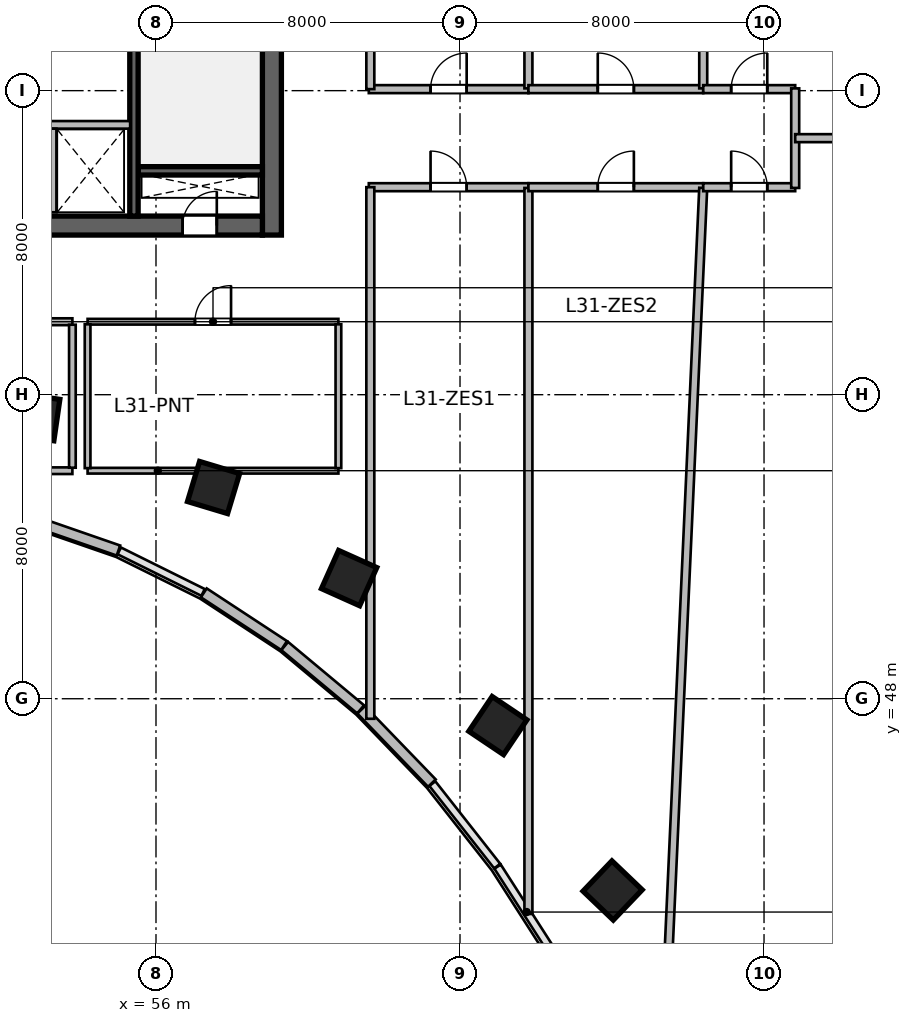
"""IFC4 building model, lengths in metres.
Left out: names, types, materials, properties, quantities, classifications, styles, units other than length and angle.
Written with IfcOpenShell. Run it as: python <this file> out.ifc"""

import sys

from ifc_helpers import new_model, si_unit, direction, frame, frame_2d, origin, origin_2d, place, context, subcontext, project, spatial, rectangle, extrude, source, transform, mapped, element, fill, save


model = new_model("IFC4")
c1 = context("Model", 3, precision=1e-05, world=origin(), true_north=direction((0.0, 1.0)))
c2 = subcontext(c1, "Body", "Model", "MODEL_VIEW")
j1 = project(units=[si_unit("LENGTHUNIT", "METRE"), si_unit("PLANEANGLEUNIT", "RADIAN")], contexts=[c1])
p1 = place(None, origin())
s1 = spatial("IfcSite", under=j1, at=p1, CompositionType="ELEMENT")
p2 = place(p1, origin())
s2 = spatial("IfcBuilding", under=s1, at=p2, CompositionType="ELEMENT")
p3 = place(p2, frame((0.0, 0.0, 131.1)))
s3 = spatial("IfcBuildingStorey", under=s2, at=p3, CompositionType="ELEMENT", Elevation=131.1)
m1 = source(origin(), c2, "Body", "SweptSolid", [
    extrude(rectangle(XDim=12.0, YDim=0.5, at=frame_2d((6.0, 0.0))), origin(), (0.0, 0.0, 1.0), 3.9),
])
p4 = place(p3, frame((59.05, 60.2, 0.0), z_axis=(0.0, 0.0, 1.0), x_axis=(0.0, 1.0, 0.0)))
e1 = element("IfcWall", 1, at=p4, inside=s3, PredefinedType="SHEAR", context=c2, shape_type="MappedRepresentation", body=[
    mapped(m1, transform((0.0, 0.0, 0.0), scale=1.0)),
])
m2 = source(origin(), c2, "Body", "SweptSolid", [
    extrude(rectangle(XDim=21.6, YDim=0.5, at=frame_2d((10.8, 0.0))), origin(), (0.0, 0.0, 1.0), 3.9),
])
p5 = place(p3, frame((37.2, 60.45, 0.0), z_axis=(0.0, 0.0, 1.0), x_axis=(1.0, 0.0, 0.0)))
e2 = element("IfcWall", 2, at=p5, inside=s3, PredefinedType="SHEAR", context=c2, shape_type="MappedRepresentation", body=[
    mapped(m2, transform((0.0, 0.0, 0.0), scale=1.0)),
])
p6 = place(p5, frame((1.1, 0.0, 0.0)))
e3 = element("IfcOpeningElement", 3, at=p6, cuts=e2, PredefinedType="OPENING", context=c2, shape_type="SweptSolid", body=[
    extrude(rectangle(XDim=1.15, YDim=2.15, at=frame_2d((0.575, 1.075))), frame((0.0, 0.26, 0.0), z_axis=(0.0, -1.0, 0.0), x_axis=(1.0, 0.0, 0.0)), (0.0, 0.0, 1.0), 0.52),
])
p7 = place(p5, frame((19.5, 0.0, 0.0)))
e4 = element("IfcOpeningElement", 4, at=p7, cuts=e2, PredefinedType="OPENING", context=c2, shape_type="SweptSolid", body=[
    extrude(rectangle(XDim=0.9, YDim=2.1, at=frame_2d((0.45, 1.05))), frame((0.0, 0.26, 0.0), z_axis=(0.0, -1.0, 0.0), x_axis=(1.0, 0.0, 0.0)), (0.0, 0.0, 1.0), 0.52),
])
p8 = place(p5, frame((12.02, 0.0, 0.0)))
e5 = element("IfcOpeningElement", 5, at=p8, cuts=e2, PredefinedType="OPENING", context=c2, shape_type="SweptSolid", body=[
    extrude(rectangle(XDim=1.6, YDim=2.15, at=frame_2d((0.8, 1.075))), frame((0.0, 0.26, 0.0), z_axis=(0.0, -1.0, 0.0), x_axis=(1.0, 0.0, 0.0)), (0.0, 0.0, 1.0), 0.52),
])
m3 = source(origin(), c2, "Body", "SweptSolid", [
    extrude(rectangle(XDim=3.27, YDim=0.22, at=frame_2d((1.635, 0.0))), origin(), (0.0, 0.0, 1.0), 3.9),
])
p9 = place(p3, frame((55.53, 61.89, 0.0), z_axis=(0.0, 0.0, 1.0), x_axis=(1.0, 0.0, 0.0)))
e6 = element("IfcWall", 6, at=p9, inside=s3, PredefinedType="SHEAR", context=c2, shape_type="MappedRepresentation", body=[
    mapped(m3, transform((0.0, 0.0, 0.0), scale=1.0)),
])
m4 = source(origin(), c2, "Body", "SweptSolid", [
    extrude(rectangle(XDim=11.0, YDim=0.22, at=frame_2d((5.5, 0.0))), origin(), (0.0, 0.0, 1.0), 3.9),
])
p10 = place(p3, frame((55.42, 60.7, 0.0), z_axis=(0.0, 0.0, 1.0), x_axis=(0.0, 1.0, 0.0)))
e7 = element("IfcWall", 7, at=p10, inside=s3, PredefinedType="SHEAR", context=c2, shape_type="MappedRepresentation", body=[
    mapped(m4, transform((0.0, 0.0, 0.0), scale=1.0)),
])
p11 = place(p10, frame((9.545, 0.0, 0.0)))
e8 = element("IfcOpeningElement", 8, at=p11, cuts=e7, PredefinedType="OPENING", context=c2, shape_type="SweptSolid", body=[
    extrude(rectangle(XDim=1.15, YDim=2.15, at=frame_2d((0.575, 1.075))), frame((0.0, 0.12, 0.0), z_axis=(0.0, -1.0, 0.0), x_axis=(1.0, 0.0, 0.0)), (0.0, 0.0, 1.0), 0.24),
])
m5 = source(origin(), c2, "Body", "SweptSolid", [
    extrude(rectangle(XDim=1.1, YDim=1.1, at=origin_2d()), origin(), (0.0, 0.0, 1.0), 3.9),
])
for number, where, z_axis, x_axis in (
    (9, (52.846, 55.411, 0.0), (0.0, 0.0, 1.0), (0.143, 0.99, 0.0)),
    (10, (57.515, 53.558, 0.0), (0.0, 0.0, 1.0), (0.289, 0.957, 0.0)),
    (11, (61.082, 51.175, 0.0), (0.0, 0.0, 1.0), (0.409, 0.912, 0.0)),
    (12, (64.996, 47.294, 0.0), (0.0, 0.0, 1.0), (0.558, 0.83, 0.0)),
    (13, (68.015, 42.955, 0.0), (0.0, 0.0, 1.0), (0.691, 0.723, 0.0)),
):
    element("IfcColumn", number, at=place(p3, frame(where, z_axis=z_axis, x_axis=x_axis)), inside=s3, PredefinedType="COLUMN", context=c2, shape_type="MappedRepresentation", body=[
        mapped(m5, transform((0.0, 0.0, 0.0), scale=1.0)),
    ])
m6 = source(origin(), c2, "Body", "SweptSolid", [
    extrude(rectangle(XDim=2.68, YDim=0.28, at=frame_2d((1.34, 0.0))), origin(), (0.0, 0.0, 1.0), 3.65),
])
p12 = place(p3, frame((63.26, 45.78, 0.0), z_axis=(0.0, 0.0, 1.0), x_axis=(-0.694561996568, 0.719432855049, 0.0)))
e14 = element("IfcWall", 14, at=p12, inside=s3, PredefinedType="SOLIDWALL", context=c2, shape_type="MappedRepresentation", body=[
    mapped(m6, transform((0.0, 0.0, 0.0), scale=1.0)),
])
m7 = source(origin(), c2, "Body", "SweptSolid", [
    extrude(rectangle(XDim=2.601, YDim=0.28, at=frame_2d((1.3, 0.0))), origin(), (0.0, 0.0, 1.0), 3.65),
])
p13 = place(p3, frame((61.385, 47.721, 0.0), z_axis=(0.0, 0.0, 1.0), x_axis=(-0.76796730295, 0.640489048775, 0.0)))
e15 = element("IfcWall", 15, at=p13, inside=s3, PredefinedType="SOLIDWALL", context=c2, shape_type="MappedRepresentation", body=[
    mapped(m7, transform((0.0, 0.0, 0.0), scale=1.0)),
])
m8 = source(origin(), c2, "Body", "SweptSolid", [
    extrude(rectangle(XDim=2.527, YDim=0.28, at=frame_2d((1.264, 0.0))), origin(), (0.0, 0.0, 1.0), 3.65),
])
p14 = place(p3, frame((59.371, 49.399, 0.0), z_axis=(0.0, 0.0, 1.0), x_axis=(-0.836011905051, 0.548711303523, 0.0)))
e16 = element("IfcWall", 16, at=p14, inside=s3, PredefinedType="SOLIDWALL", context=c2, shape_type="MappedRepresentation", body=[
    mapped(m8, transform((0.0, 0.0, 0.0), scale=1.0)),
])
m9 = source(origin(), c2, "Body", "SweptSolid", [
    extrude(rectangle(XDim=2.411, YDim=0.28, at=frame_2d((1.205, 0.0))), origin(), (0.0, 0.0, 1.0), 3.65),
])
p15 = place(p3, frame((55.012, 51.899, 0.0), z_axis=(0.0, 0.0, 1.0), x_axis=(-0.944880068161, 0.327416640982, 0.0)))
e17 = element("IfcWall", 17, at=p15, inside=s3, PredefinedType="SOLIDWALL", context=c2, shape_type="MappedRepresentation", body=[
    mapped(m9, transform((0.0, 0.0, 0.0), scale=1.0)),
])
m10 = source(origin(), c2, "Body", "SweptSolid", [
    extrude(rectangle(XDim=4.1, YDim=0.2, at=frame_2d((2.05, 0.0))), origin(), (0.0, 0.0, 1.0), 3.65),
])
p16 = place(p3, frame((51.22, 63.1, 0.0), z_axis=(0.0, 0.0, 1.0), x_axis=(1.0, 0.0, 0.0)))
e18 = element("IfcWall", 18, at=p16, inside=s3, PredefinedType="SOLIDWALL", context=c2, shape_type="MappedRepresentation", body=[
    mapped(m10, transform((0.0, 0.0, 0.0), scale=1.0)),
])
m11 = source(origin(), c2, "Body", "SweptSolid", [
    extrude(rectangle(XDim=2.2, YDim=0.2, at=frame_2d((1.1, 0.0))), origin(), (0.0, 0.0, 1.0), 3.65),
])
p17 = place(p3, frame((53.28, 60.8, 0.0), z_axis=(0.0, 0.0, 1.0), x_axis=(0.0, 1.0, 0.0)))
e19 = element("IfcWall", 19, at=p17, inside=s3, PredefinedType="SOLIDWALL", context=c2, shape_type="MappedRepresentation", body=[
    mapped(m11, transform((0.0, 0.0, 0.0), scale=1.0)),
])
m12 = source(origin(), c2, "Body", "SweptSolid", [
    extrude(rectangle(XDim=3.248, YDim=0.175, at=frame_2d((1.624, 0.0))), origin(), (0.0, 0.0, 1.0), 3.65),
])
p18 = place(p3, frame((50.552, 54.0, 0.0), z_axis=(0.0, 0.0, 1.0), x_axis=(1.0, 0.0, 0.0)))
e20 = element("IfcWall", 20, at=p18, inside=s3, PredefinedType="PARTITIONING", context=c2, shape_type="MappedRepresentation", body=[
    mapped(m12, transform((0.0, 0.0, 0.0), scale=1.0)),
])
m13 = source(origin(), c2, "Body", "SweptSolid", [
    extrude(rectangle(XDim=3.248, YDim=0.18, at=frame_2d((1.624, 0.0))), origin(), (0.0, 0.0, 1.0), 3.65),
])
p19 = place(p3, frame((50.552, 57.92, 0.0), z_axis=(0.0, 0.0, 1.0), x_axis=(1.0, 0.0, 0.0)))
e21 = element("IfcWall", 21, at=p19, inside=s3, PredefinedType="PLUMBINGWALL", context=c2, shape_type="MappedRepresentation", body=[
    mapped(m13, transform((0.0, 0.0, 0.0), scale=1.0)),
])
p20 = place(p19, frame((1.149, 0.0, 0.0)))
e22 = element("IfcOpeningElement", 22, at=p20, cuts=e21, PredefinedType="OPENING", context=c2, shape_type="SweptSolid", body=[
    extrude(rectangle(XDim=0.95, YDim=2.12, at=frame_2d((0.475, 1.06))), frame((0.0, 0.1, 0.0), z_axis=(0.0, -1.0, 0.0), x_axis=(1.0, 0.0, 0.0)), (0.0, 0.0, 1.0), 0.2),
])
m14 = source(origin(), c2, "Body", "SweptSolid", [
    extrude(rectangle(XDim=3.763, YDim=0.175, at=frame_2d((1.881, 0.0))), origin(), (0.0, 0.0, 1.0), 3.65),
])
p21 = place(p3, frame((53.8, 54.079, 0.0), z_axis=(0.0, 0.0, 1.0), x_axis=(0.0, 1.0, 0.0)))
e23 = element("IfcWall", 23, at=p21, inside=s3, PredefinedType="PARTITIONING", context=c2, shape_type="MappedRepresentation", body=[
    mapped(m14, transform((0.0, 0.0, 0.0), scale=1.0)),
])
m15 = source(origin(), c2, "Body", "SweptSolid", [
    extrude(rectangle(XDim=6.6, YDim=0.15, at=frame_2d((3.3, 0.0))), origin(), (0.0, 0.0, 1.0), 3.095),
])
p22 = place(p3, frame((54.2, 54.0, 0.0), z_axis=(0.0, 0.0, 1.0), x_axis=(1.0, 0.0, 0.0)))
e24 = element("IfcWall", 24, at=p22, inside=s3, PredefinedType="PARTITIONING", context=c2, shape_type="MappedRepresentation", body=[
    mapped(m15, transform((0.0, 0.0, 0.0), scale=1.0)),
])
m16 = source(origin(), c2, "Body", "SweptSolid", [
    extrude(rectangle(XDim=6.6, YDim=0.15, at=frame_2d((3.3, 0.0))), origin(), (0.0, 0.0, 1.0), 3.65),
])
p23 = place(p3, frame((54.2, 57.92, 0.0), z_axis=(0.0, 0.0, 1.0), x_axis=(1.0, 0.0, 0.0)))
e25 = element("IfcWall", 25, at=p23, inside=s3, PredefinedType="PARTITIONING", context=c2, shape_type="MappedRepresentation", body=[
    mapped(m16, transform((0.0, 0.0, 0.0), scale=1.0)),
])
p24 = place(p23, frame((2.825, 0.0, 0.0)))
e26 = element("IfcOpeningElement", 26, at=p24, cuts=e25, PredefinedType="OPENING", context=c2, shape_type="SweptSolid", body=[
    extrude(rectangle(XDim=0.95, YDim=2.1, at=frame_2d((0.475, 1.05))), frame((0.0, 0.085, 0.0), z_axis=(0.0, -1.0, 0.0), x_axis=(1.0, 0.0, 0.0)), (0.0, 0.0, 1.0), 0.17),
])
m17 = source(origin(), c2, "Body", "SweptSolid", [
    extrude(rectangle(XDim=3.785, YDim=0.15, at=frame_2d((1.893, 0.0))), origin(), (0.0, 0.0, 1.0), 3.65),
])
for number, where, z_axis, x_axis in (
    (27, (54.2, 54.067, 0.0), (0.0, 0.0, 1.0), (0.0, 1.0, 0.0)),
    (28, (60.8, 54.067, 0.0), (0.0, 0.0, 1.0), (0.0, 1.0, 0.0)),
):
    element("IfcWall", number, at=place(p3, frame(where, z_axis=z_axis, x_axis=x_axis)), inside=s3, PredefinedType="PARTITIONING", context=c2, shape_type="MappedRepresentation", body=[
        mapped(m17, transform((0.0, 0.0, 0.0), scale=1.0)),
    ])
m18 = source(origin(), c2, "Body", "SweptSolid", [
    extrude(rectangle(XDim=4.2, YDim=0.21, at=frame_2d((2.1, 0.0))), origin(), (0.0, 0.0, 1.0), 3.65),
])
p25 = place(p3, frame((61.6, 64.04, 0.0), z_axis=(0.0, 0.0, 1.0), x_axis=(1.0, 0.0, 0.0)))
e29 = element("IfcWall", 29, at=p25, inside=s3, PredefinedType="PARTITIONING", context=c2, shape_type="MappedRepresentation", body=[
    mapped(m18, transform((0.0, 0.0, 0.0), scale=1.0)),
])
p26 = place(p25, frame((1.625, 0.0, 0.0)))
e30 = element("IfcOpeningElement", 30, at=p26, cuts=e29, PredefinedType="OPENING", context=c2, shape_type="SweptSolid", body=[
    extrude(rectangle(XDim=0.95, YDim=2.1, at=frame_2d((0.475, 1.05))), frame((0.0, 0.115, 0.0), z_axis=(0.0, -1.0, 0.0), x_axis=(1.0, 0.0, 0.0)), (0.0, 0.0, 1.0), 0.23),
])
m19 = source(origin(), c2, "Body", "SweptSolid", [
    extrude(rectangle(XDim=9.736, YDim=0.21, at=frame_2d((4.868, 0.0))), origin(), (0.0, 0.0, 1.0), 3.65),
])
p27 = place(p3, frame((65.8, 64.06, 0.0), z_axis=(0.0, 0.0, 1.0), x_axis=(0.0, 1.0, 0.0)))
e31 = element("IfcWall", 31, at=p27, inside=s3, PredefinedType="PARTITIONING", context=c2, shape_type="MappedRepresentation", body=[
    mapped(m19, transform((0.0, 0.0, 0.0), scale=1.0)),
])
m20 = source(origin(), c2, "Body", "SweptSolid", [
    extrude(rectangle(XDim=4.6, YDim=0.21, at=frame_2d((2.3, 0.0))), origin(), (0.0, 0.0, 1.0), 3.65),
])
p28 = place(p3, frame((65.8, 64.04, 0.0), z_axis=(0.0, 0.0, 1.0), x_axis=(1.0, 0.0, 0.0)))
e32 = element("IfcWall", 32, at=p28, inside=s3, PredefinedType="PARTITIONING", context=c2, shape_type="MappedRepresentation", body=[
    mapped(m20, transform((0.0, 0.0, 0.0), scale=1.0)),
])
p29 = place(p28, frame((1.825, 0.0, 0.0)))
e33 = element("IfcOpeningElement", 33, at=p29, cuts=e32, PredefinedType="OPENING", context=c2, shape_type="SweptSolid", body=[
    extrude(rectangle(XDim=0.95, YDim=2.1, at=frame_2d((0.475, 1.05))), frame((0.0, 0.115, 0.0), z_axis=(0.0, -1.0, 0.0), x_axis=(1.0, 0.0, 0.0)), (0.0, 0.0, 1.0), 0.23),
])
m21 = source(origin(), c2, "Body", "SweptSolid", [
    extrude(rectangle(XDim=6.398, YDim=0.21, at=frame_2d((3.199, 0.0))), origin(), (0.0, 0.0, 1.0), 3.65),
])
p30 = place(p3, frame((70.4, 64.06, 0.0), z_axis=(0.0, 0.0, 1.0), x_axis=(0.0, 1.0, 0.0)))
e34 = element("IfcWall", 34, at=p30, inside=s3, PredefinedType="PARTITIONING", context=c2, shape_type="MappedRepresentation", body=[
    mapped(m21, transform((0.0, 0.0, 0.0), scale=1.0)),
])
m22 = source(origin(), c2, "Body", "SweptSolid", [
    extrude(rectangle(XDim=2.42, YDim=0.21, at=frame_2d((1.21, 0.0))), origin(), (0.0, 0.0, 1.0), 3.65),
])
p31 = place(p3, frame((70.4, 64.04, 0.0), z_axis=(0.0, 0.0, 1.0), x_axis=(1.0, 0.0, 0.0)))
e35 = element("IfcWall", 35, at=p31, inside=s3, PredefinedType="PARTITIONING", context=c2, shape_type="MappedRepresentation", body=[
    mapped(m22, transform((0.0, 0.0, 0.0), scale=1.0)),
])
p32 = place(p31, frame((0.735, 0.0, 0.0)))
e36 = element("IfcOpeningElement", 36, at=p32, cuts=e35, PredefinedType="OPENING", context=c2, shape_type="SweptSolid", body=[
    extrude(rectangle(XDim=0.95, YDim=2.1, at=frame_2d((0.475, 1.05))), frame((0.0, 0.115, 0.0), z_axis=(0.0, -1.0, 0.0), x_axis=(1.0, 0.0, 0.0)), (0.0, 0.0, 1.0), 0.23),
])
p33 = place(p3, frame((61.6, 61.46, 0.0), z_axis=(0.0, 0.0, 1.0), x_axis=(1.0, 0.0, 0.0)))
e37 = element("IfcWall", 37, at=p33, inside=s3, PredefinedType="PARTITIONING", context=c2, shape_type="MappedRepresentation", body=[
    mapped(m18, transform((0.0, 0.0, 0.0), scale=1.0)),
])
p34 = place(p33, frame((1.625, 0.0, 0.0)))
e38 = element("IfcOpeningElement", 38, at=p34, cuts=e37, PredefinedType="OPENING", context=c2, shape_type="SweptSolid", body=[
    extrude(rectangle(XDim=0.95, YDim=2.1, at=frame_2d((0.475, 1.05))), frame((0.0, 0.115, 0.0), z_axis=(0.0, -1.0, 0.0), x_axis=(1.0, 0.0, 0.0)), (0.0, 0.0, 1.0), 0.23),
])
m23 = source(origin(), c2, "Body", "SweptSolid", [
    extrude(rectangle(XDim=19.103, YDim=0.21, at=frame_2d((9.552, 0.0))), origin(), (0.0, 0.0, 1.0), 2.942),
])
p35 = place(p3, frame((65.8, 42.337, 0.0), z_axis=(0.0, 0.0, 1.0), x_axis=(0.0, 1.0, 0.0)))
e39 = element("IfcWall", 39, at=p35, inside=s3, PredefinedType="PARTITIONING", context=c2, shape_type="MappedRepresentation", body=[
    mapped(m23, transform((0.0, 0.0, 0.0), scale=1.0)),
])
p36 = place(p3, frame((65.8, 61.46, 0.0), z_axis=(0.0, 0.0, 1.0), x_axis=(1.0, 0.0, 0.0)))
e40 = element("IfcWall", 40, at=p36, inside=s3, PredefinedType="PARTITIONING", context=c2, shape_type="MappedRepresentation", body=[
    mapped(m20, transform((0.0, 0.0, 0.0), scale=1.0)),
])
p37 = place(p36, frame((1.825, 0.0, 0.0)))
e41 = element("IfcOpeningElement", 41, at=p37, cuts=e40, PredefinedType="OPENING", context=c2, shape_type="SweptSolid", body=[
    extrude(rectangle(XDim=0.95, YDim=2.1, at=frame_2d((0.475, 1.05))), frame((0.0, 0.115, 0.0), z_axis=(0.0, -1.0, 0.0), x_axis=(1.0, 0.0, 0.0)), (0.0, 0.0, 1.0), 0.23),
])
m24 = source(origin(), c2, "Body", "SweptSolid", [
    extrude(rectangle(XDim=24.224, YDim=0.21, at=frame_2d((12.112, 0.0))), origin(), (0.0, 0.0, 1.0), 2.942),
])
p38 = place(p3, frame((69.302, 37.241, 0.0), z_axis=(0.0, 0.0, 1.0), x_axis=(0.045312570313, 0.998972857975, 0.0)))
e42 = element("IfcWall", 42, at=p38, inside=s3, PredefinedType="PARTITIONING", context=c2, shape_type="MappedRepresentation", body=[
    mapped(m24, transform((0.0, 0.0, 0.0), scale=1.0)),
])
p39 = place(p3, frame((70.4, 61.46, 0.0), z_axis=(0.0, 0.0, 1.0), x_axis=(1.0, 0.0, 0.0)))
e43 = element("IfcWall", 43, at=p39, inside=s3, PredefinedType="PARTITIONING", context=c2, shape_type="MappedRepresentation", body=[
    mapped(m22, transform((0.0, 0.0, 0.0), scale=1.0)),
])
p40 = place(p39, frame((0.735, 0.0, 0.0)))
e44 = element("IfcOpeningElement", 44, at=p40, cuts=e43, PredefinedType="OPENING", context=c2, shape_type="SweptSolid", body=[
    extrude(rectangle(XDim=0.95, YDim=2.1, at=frame_2d((0.475, 1.05))), frame((0.0, 0.115, 0.0), z_axis=(0.0, -1.0, 0.0), x_axis=(1.0, 0.0, 0.0)), (0.0, 0.0, 1.0), 0.23),
])
m25 = source(origin(), c2, "Body", "SweptSolid", [
    extrude(rectangle(XDim=13.988, YDim=0.21, at=frame_2d((6.994, 0.0))), origin(), (0.0, 0.0, 1.0), 2.942),
])
p41 = place(p3, frame((61.64, 47.472, 0.0), z_axis=(0.0, 0.0, 1.0), x_axis=(0.0, 1.0, 0.0)))
e45 = element("IfcWall", 45, at=p41, inside=s3, PredefinedType="PARTITIONING", context=c2, shape_type="MappedRepresentation", body=[
    mapped(m25, transform((0.0, 0.0, 0.0), scale=1.0)),
])
m26 = source(origin(), c2, "Body", "SweptSolid", [
    extrude(rectangle(XDim=11.987, YDim=0.21, at=frame_2d((5.994, 0.0))), origin(), (0.0, 0.0, 1.0), 3.65),
])
p42 = place(p3, frame((61.64, 64.04, 0.0), z_axis=(0.0, 0.0, 1.0), x_axis=(0.0, 1.0, 0.0)))
e46 = element("IfcWall", 46, at=p42, inside=s3, PredefinedType="PARTITIONING", context=c2, shape_type="MappedRepresentation", body=[
    mapped(m26, transform((0.0, 0.0, 0.0), scale=1.0)),
])
m27 = source(origin(), c2, "Body", "SweptSolid", [
    extrude(rectangle(XDim=2.62, YDim=0.21, at=frame_2d((1.31, 0.0))), origin(), (0.0, 0.0, 1.0), 3.28),
])
p43 = place(p3, frame((72.82, 61.44, 0.0), z_axis=(0.0, 0.0, 1.0), x_axis=(0.0, 1.0, 0.0)))
e47 = element("IfcWall", 47, at=p43, inside=s3, PredefinedType="PARTITIONING", context=c2, shape_type="MappedRepresentation", body=[
    mapped(m27, transform((0.0, 0.0, 0.0), scale=1.0)),
])
m28 = source(origin(), c2, "Body", "SweptSolid", [
    extrude(rectangle(XDim=4.917, YDim=0.21, at=frame_2d((2.459, 0.0))), origin(), (0.0, 0.0, 1.0), 3.65),
])
p44 = place(p3, frame((72.82, 62.75, 0.0), z_axis=(0.0, 0.0, 1.0), x_axis=(1.0, 0.0, 0.0)))
e48 = element("IfcWall", 48, at=p44, inside=s3, PredefinedType="PARTITIONING", context=c2, shape_type="MappedRepresentation", body=[
    mapped(m28, transform((0.0, 0.0, 0.0), scale=1.0)),
])
m29 = source(origin(), c2, "Body", "SweptSolid", [
    extrude(rectangle(XDim=0.9, YDim=2.1, at=frame_2d((0.45, 1.05))), frame((0.0, 0.025, 0.0), z_axis=(0.0, -1.0, 0.0), x_axis=(1.0, 0.0, 0.0)), (0.0, 0.0, 1.0), 0.05),
])
p45 = place(p7, origin())
e49 = element("IfcDoor", 49, at=p45, inside=s3, OperationType="SINGLE_SWING_RIGHT", PredefinedType="DOOR", context=c2, shape_type="MappedRepresentation", body=[
    mapped(m29, transform((0.0, 0.0, 0.0), scale=1.0)),
])
fill(e4, e49)
m30 = source(origin(), c2, "Body", "SweptSolid", [
    extrude(rectangle(XDim=0.95, YDim=2.1, at=frame_2d((0.475, 1.05))), frame((0.0, 0.025, 0.0), z_axis=(0.0, -1.0, 0.0), x_axis=(1.0, 0.0, 0.0)), (0.0, 0.0, 1.0), 0.05),
])
p46 = place(p24, origin())
e50 = element("IfcDoor", 50, at=p46, inside=s3, OperationType="SINGLE_SWING_RIGHT", PredefinedType="DOOR", context=c2, shape_type="MappedRepresentation", body=[
    mapped(m30, transform((0.0, 0.0, 0.0), scale=1.0)),
])
fill(e26, e50)
p47 = place(p26, origin())
e51 = element("IfcDoor", 51, at=p47, inside=s3, OperationType="SINGLE_SWING_RIGHT", PredefinedType="DOOR", context=c2, shape_type="MappedRepresentation", body=[
    mapped(m30, transform((0.0, 0.0, 0.0), scale=1.0)),
])
fill(e30, e51)
p48 = place(p29, origin())
e52 = element("IfcDoor", 52, at=p48, inside=s3, OperationType="SINGLE_SWING_LEFT", PredefinedType="DOOR", context=c2, shape_type="MappedRepresentation", body=[
    mapped(m30, transform((0.0, 0.0, 0.0), scale=1.0)),
])
fill(e33, e52)
p49 = place(p32, origin())
e53 = element("IfcDoor", 53, at=p49, inside=s3, OperationType="SINGLE_SWING_RIGHT", PredefinedType="DOOR", context=c2, shape_type="MappedRepresentation", body=[
    mapped(m30, transform((0.0, 0.0, 0.0), scale=1.0)),
])
fill(e36, e53)
p50 = place(p34, origin())
e54 = element("IfcDoor", 54, at=p50, inside=s3, OperationType="SINGLE_SWING_LEFT", PredefinedType="DOOR", context=c2, shape_type="MappedRepresentation", body=[
    mapped(m30, transform((0.0, 0.0, 0.0), scale=1.0)),
])
fill(e38, e54)
p51 = place(p37, origin())
e55 = element("IfcDoor", 55, at=p51, inside=s3, OperationType="SINGLE_SWING_RIGHT", PredefinedType="DOOR", context=c2, shape_type="MappedRepresentation", body=[
    mapped(m30, transform((0.0, 0.0, 0.0), scale=1.0)),
])
fill(e41, e55)
p52 = place(p40, origin())
e56 = element("IfcDoor", 56, at=p52, inside=s3, OperationType="SINGLE_SWING_LEFT", PredefinedType="DOOR", context=c2, shape_type="MappedRepresentation", body=[
    mapped(m30, transform((0.0, 0.0, 0.0), scale=1.0)),
])
fill(e44, e56)
save(model, sys.argv[1])
